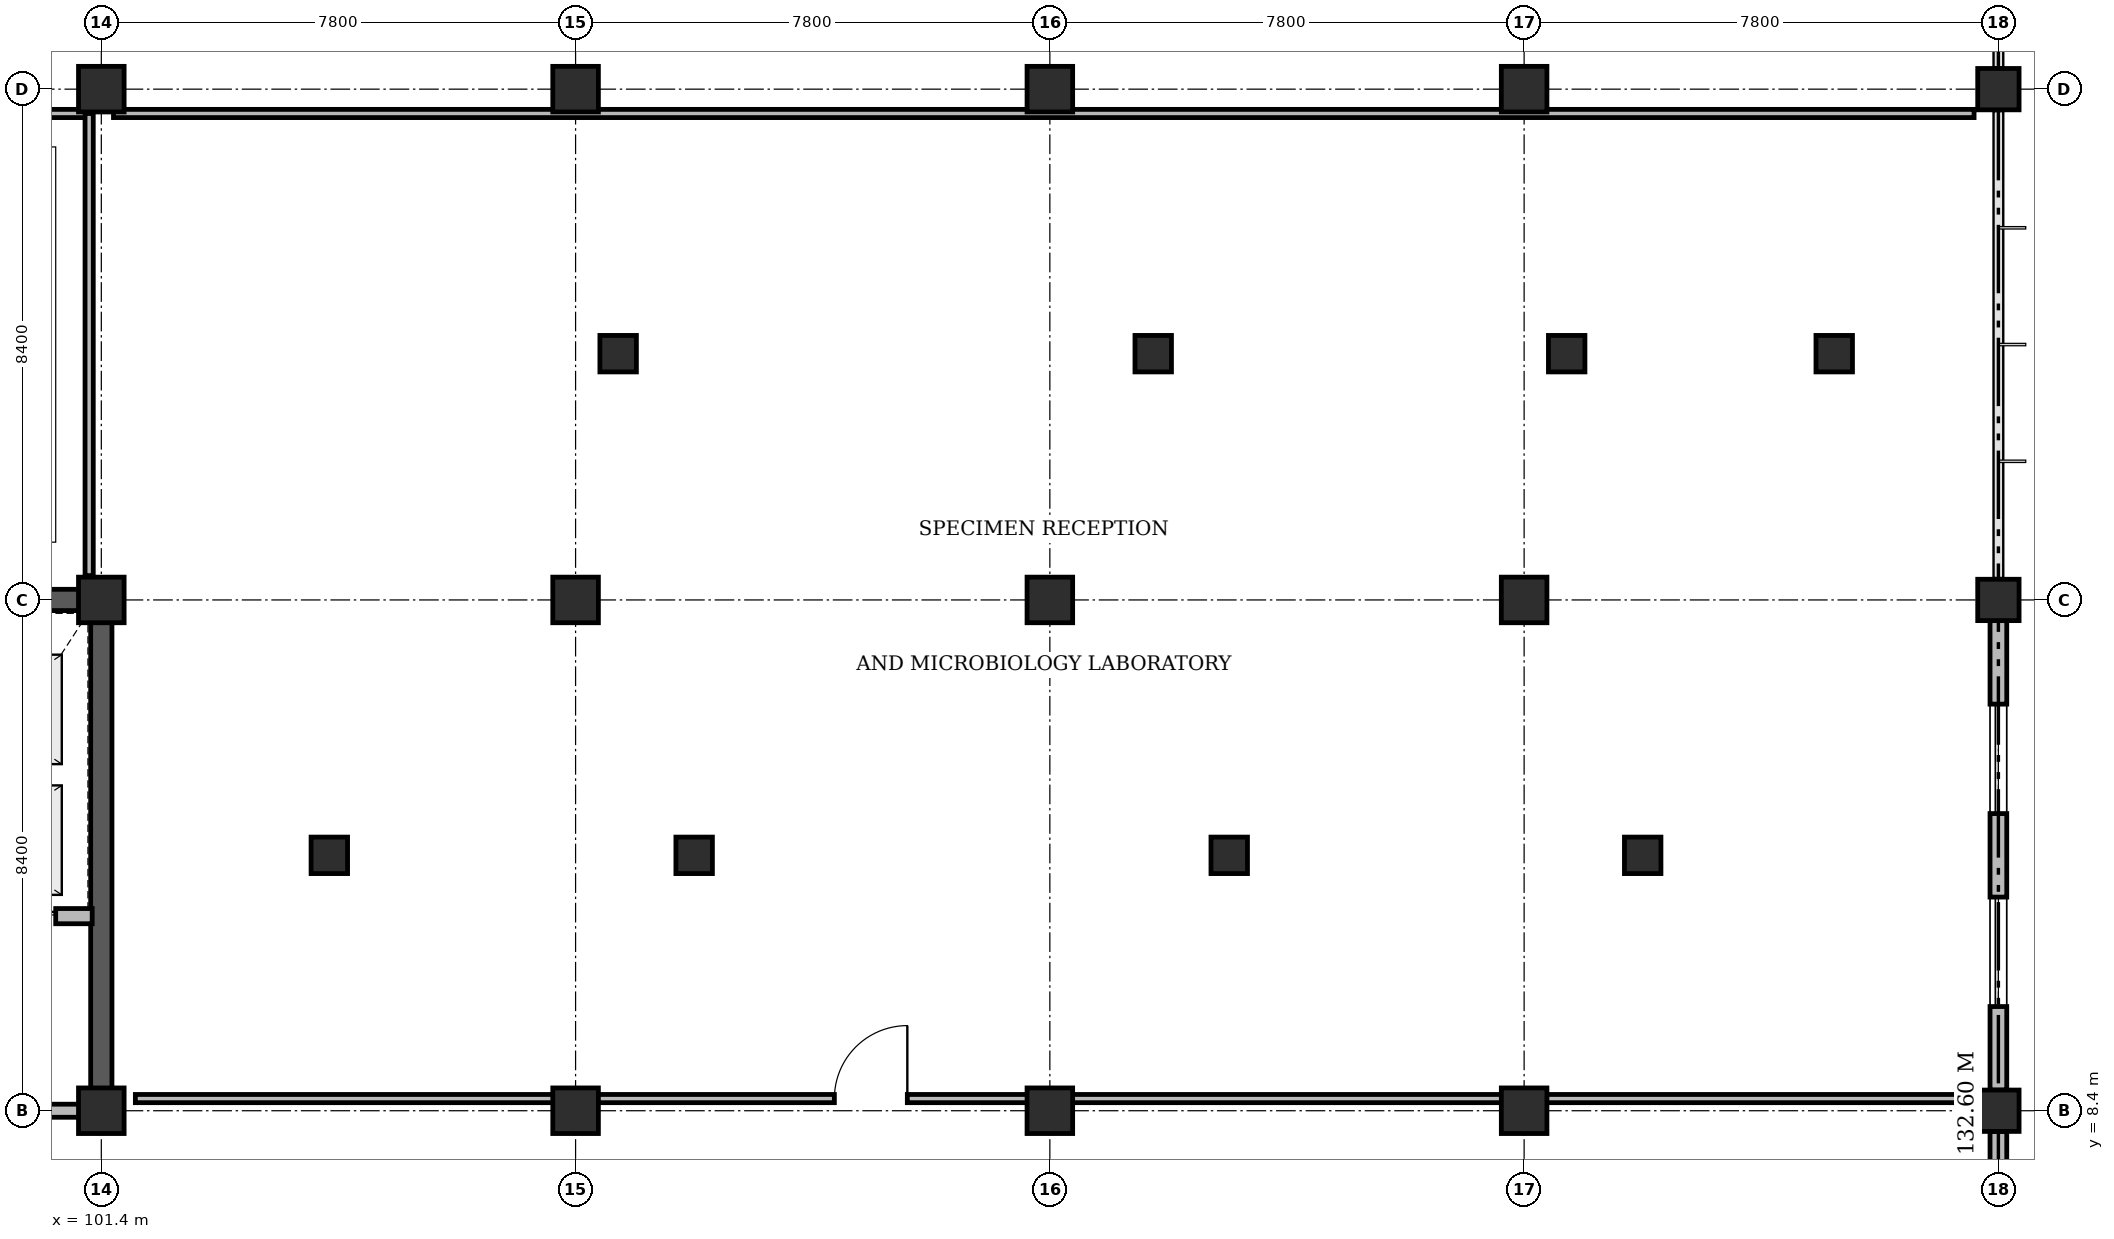
"""IFC4 building model, lengths in metres.
Left out: names, types, materials, properties, quantities, classifications, styles, units other than length and angle.
Written with IfcOpenShell. Run it as: python <this file> out.ifc"""

import sys

from ifc_helpers import new_model, si_unit, direction, frame, frame_2d, origin, origin_2d, place, context, subcontext, project, spatial, rectangle, circle, extrude, element, fill, save


model = new_model("IFC4")
c1 = context("Model", 3, precision=1e-05, world=origin(), true_north=direction((0.0, 1.0)))
c2 = subcontext(c1, "Body", "Model", "MODEL_VIEW")
j1 = project(units=[si_unit("LENGTHUNIT", "METRE"), si_unit("PLANEANGLEUNIT", "RADIAN")], contexts=[c1])
p1 = place(None, origin())
s1 = spatial("IfcSite", under=j1, at=p1, CompositionType="ELEMENT")
p2 = place(p1, origin())
s2 = spatial("IfcBuilding", under=s1, at=p2, CompositionType="ELEMENT")
p3 = place(p2, frame((0.0, 0.0, 4.8)))
s3 = spatial("IfcBuildingStorey", under=s2, at=p3, CompositionType="ELEMENT", Elevation=4.8)
p4 = place(p3, frame((93.425, 16.8, 0.0), z_axis=(0.0, 0.0, 1.0), x_axis=(1.0, 0.0, 0.0)))
e1 = element("IfcWall", 1, at=p4, inside=s3, PredefinedType="SHEAR", context=c2, shape_type="SweptSolid", body=[
    extrude(rectangle(XDim=8.15, YDim=0.35, at=frame_2d((4.075, 0.0))), origin(), (0.0, 0.0, 1.0), 4.48),
])
p5 = place(p3, frame((101.4, 8.4, 0.0), z_axis=(0.0, 0.0, 1.0), x_axis=(0.0, 1.0, 0.0)))
e2 = element("IfcWall", 2, at=p5, inside=s3, PredefinedType="SHEAR", context=c2, shape_type="SweptSolid", body=[
    extrude(rectangle(XDim=8.4, YDim=0.35, at=frame_2d((4.2, 0.0))), origin(), (0.0, 0.0, 1.0), 4.48),
])
for number, where, z_axis, x_axis in (
    (3, (101.4, 8.4, 0.0), (0.0, 0.0, 1.0), (1.0, 0.0, 0.0)),
    (4, (101.4, 16.8, 0.0), (0.0, 0.0, 1.0), (1.0, 0.0, 0.0)),
    (5, (101.4, 25.2, 0.0), (0.0, 0.0, 1.0), (1.0, 0.0, 0.0)),
    (6, (109.2, 8.4, 0.0), (0.0, 0.0, 1.0), (1.0, 0.0, 0.0)),
    (7, (109.2, 16.8, 0.0), (0.0, 0.0, 1.0), (1.0, 0.0, 0.0)),
    (8, (109.2, 25.2, 0.0), (0.0, 0.0, 1.0), (1.0, 0.0, 0.0)),
    (9, (117.0, 8.4, 0.0), (0.0, 0.0, 1.0), (1.0, 0.0, 0.0)),
    (10, (117.0, 16.8, 0.0), (0.0, 0.0, 1.0), (1.0, 0.0, 0.0)),
    (11, (117.0, 25.2, 0.0), (0.0, 0.0, 1.0), (1.0, 0.0, 0.0)),
    (12, (124.8, 8.4, 0.0), (0.0, 0.0, 1.0), (1.0, 0.0, 0.0)),
    (13, (124.8, 16.8, 0.0), (0.0, 0.0, 1.0), (1.0, 0.0, 0.0)),
    (14, (124.8, 25.2, 0.0), (0.0, 0.0, 1.0), (1.0, 0.0, 0.0)),
):
    element("IfcColumn", number, at=place(p3, frame(where, z_axis=z_axis, x_axis=x_axis)), inside=s3, PredefinedType="COLUMN", context=c2, shape_type="SweptSolid", body=[
        extrude(rectangle(XDim=0.75, YDim=0.75, at=origin_2d()), origin(), (0.0, 0.0, 1.0), 4.8),
    ])
for number, where, z_axis, x_axis in (
    (15, (132.6, 8.4, 0.0), (0.0, 0.0, 1.0), (1.0, 0.0, 0.0)),
    (16, (132.6, 16.8, 0.0), (0.0, 0.0, 1.0), (1.0, 0.0, 0.0)),
    (17, (132.6, 25.2, 0.0), (0.0, 0.0, 1.0), (1.0, 0.0, 0.0)),
):
    element("IfcColumn", number, at=place(p3, frame(where, z_axis=z_axis, x_axis=x_axis)), inside=s3, PredefinedType="COLUMN", context=c2, shape_type="SweptSolid", body=[
        extrude(rectangle(XDim=0.68, YDim=0.68, at=origin_2d()), origin(), (0.0, 0.0, 1.0), 4.8),
    ])
for number, where, z_axis, x_axis in (
    (18, (129.9, 20.85, 0.0), (0.0, 0.0, 1.0), (1.0, 0.0, 0.0)),
    (19, (126.75, 12.6, 0.0), (0.0, 0.0, 1.0), (1.0, 0.0, 0.0)),
    (20, (125.5, 20.85, 0.0), (0.0, 0.0, 1.0), (1.0, 0.0, 0.0)),
    (21, (119.95, 12.6, 0.0), (0.0, 0.0, 1.0), (1.0, 0.0, 0.0)),
    (22, (118.7, 20.85, 0.0), (0.0, 0.0, 1.0), (1.0, 0.0, 0.0)),
    (23, (111.15, 12.6, 0.0), (0.0, 0.0, 1.0), (1.0, 0.0, 0.0)),
    (24, (109.9, 20.85, 0.0), (0.0, 0.0, 1.0), (1.0, 0.0, 0.0)),
    (25, (105.15, 12.6, 0.0), (0.0, 0.0, 1.0), (1.0, 0.0, 0.0)),
):
    element("IfcColumn", number, at=place(p3, frame(where, z_axis=z_axis, x_axis=x_axis)), inside=s3, PredefinedType="PILASTER", context=c2, shape_type="SweptSolid", body=[
        extrude(circle(Radius=0.3, at=origin_2d()), origin(), (0.0, 0.0, 1.0), 4.8),
    ])
p6 = place(p3, frame((132.6, 8.06, 0.0), z_axis=(0.0, 0.0, 1.0), x_axis=(0.0, -1.0, 0.0)))
e26 = element("IfcWall", 26, at=p6, inside=s3, PredefinedType="STANDARD", context=c2, shape_type="SweptSolid", body=[
    extrude(rectangle(XDim=7.72, YDim=0.275, at=frame_2d((3.86, 0.0))), origin(), (0.0, 0.0, 1.0), 3.665),
])
p7 = place(p6, frame((1.373, 0.0, 0.9)))
e27 = element("IfcOpeningElement", 27, at=p7, cuts=e26, PredefinedType="OPENING", context=c2, shape_type="SweptSolid", body=[
    extrude(rectangle(XDim=1.8, YDim=1.65, at=frame_2d((0.9, 0.825))), frame((0.0, 0.147, 0.0), z_axis=(0.0, -1.0, 0.0), x_axis=(1.0, 0.0, 0.0)), (0.0, 0.0, 1.0), 0.295),
])
p8 = place(p6, frame((4.547, 0.0, 0.9)))
e28 = element("IfcOpeningElement", 28, at=p8, cuts=e26, PredefinedType="OPENING", context=c2, shape_type="SweptSolid", body=[
    extrude(rectangle(XDim=1.8, YDim=1.65, at=frame_2d((0.9, 0.825))), frame((0.0, 0.147, 0.0), z_axis=(0.0, -1.0, 0.0), x_axis=(1.0, 0.0, 0.0)), (0.0, 0.0, 1.0), 0.295),
])
p9 = place(p3, frame((132.6, 16.46, 0.0), z_axis=(0.0, 0.0, 1.0), x_axis=(0.0, -1.0, 0.0)))
e29 = element("IfcWall", 29, at=p9, inside=s3, PredefinedType="STANDARD", context=c2, shape_type="SweptSolid", body=[
    extrude(rectangle(XDim=7.72, YDim=0.275, at=frame_2d((3.86, 0.0))), origin(), (0.0, 0.0, 1.0), 3.665),
])
p10 = place(p9, frame((1.373, 0.0, 0.9)))
e30 = element("IfcOpeningElement", 30, at=p10, cuts=e29, PredefinedType="OPENING", context=c2, shape_type="SweptSolid", body=[
    extrude(rectangle(XDim=1.8, YDim=1.65, at=frame_2d((0.9, 0.825))), frame((0.0, 0.147, 0.0), z_axis=(0.0, -1.0, 0.0), x_axis=(1.0, 0.0, 0.0)), (0.0, 0.0, 1.0), 0.295),
])
p11 = place(p9, frame((4.547, 0.0, 0.9)))
e31 = element("IfcOpeningElement", 31, at=p11, cuts=e29, PredefinedType="OPENING", context=c2, shape_type="SweptSolid", body=[
    extrude(rectangle(XDim=1.8, YDim=1.65, at=frame_2d((0.9, 0.825))), frame((0.0, 0.147, 0.0), z_axis=(0.0, -1.0, 0.0), x_axis=(1.0, 0.0, 0.0)), (0.0, 0.0, 1.0), 0.295),
])
p12 = place(p3, frame((97.75, 8.4, 0.0), z_axis=(0.0, 0.0, 1.0), x_axis=(1.0, 0.0, 0.0)))
e32 = element("IfcWall", 32, at=p12, inside=s3, PredefinedType="STANDARD", context=c2, shape_type="SweptSolid", body=[
    extrude(rectangle(XDim=3.29, YDim=0.215, at=frame_2d((1.645, 0.0))), origin(), (0.0, 0.0, 1.0), 3.68),
])
p13 = place(p12, frame((0.865, 0.0, 0.0)))
e33 = element("IfcOpeningElement", 33, at=p13, cuts=e32, PredefinedType="OPENING", context=c2, shape_type="SweptSolid", body=[
    extrude(rectangle(XDim=1.56, YDim=2.2, at=frame_2d((0.78, 1.1))), frame((0.0, 0.118, 0.0), z_axis=(0.0, -1.0, 0.0), x_axis=(1.0, 0.0, 0.0)), (0.0, 0.0, 1.0), 0.235),
])
p14 = place(p3, frame((97.75, 11.6, 0.0), z_axis=(0.0, 0.0, 1.0), x_axis=(1.0, 0.0, 0.0)))
e34 = element("IfcWall", 34, at=p14, inside=s3, PredefinedType="STANDARD", context=c2, shape_type="SweptSolid", body=[
    extrude(rectangle(XDim=3.5, YDim=0.25, at=frame_2d((1.75, 0.0))), origin(), (0.0, 0.0, 1.0), 4.46),
])
p15 = place(p14, frame((0.35, 0.0, 0.0)))
e35 = element("IfcOpeningElement", 35, at=p15, cuts=e34, PredefinedType="OPENING", context=c2, shape_type="SweptSolid", body=[
    extrude(rectangle(XDim=1.1, YDim=2.2, at=frame_2d((0.55, 1.1))), frame((0.0, 0.135, 0.0), z_axis=(0.0, -1.0, 0.0), x_axis=(1.0, 0.0, 0.0)), (0.0, 0.0, 1.0), 0.27),
])
p16 = place(p14, frame((1.8, 0.0, 0.0)))
e36 = element("IfcOpeningElement", 36, at=p16, cuts=e34, PredefinedType="OPENING", context=c2, shape_type="SweptSolid", body=[
    extrude(rectangle(XDim=1.1, YDim=2.2, at=frame_2d((0.55, 1.1))), frame((0.0, 0.135, 0.0), z_axis=(0.0, -1.0, 0.0), x_axis=(1.0, 0.0, 0.0)), (0.0, 0.0, 1.0), 0.27),
])
p17 = place(p3, frame((60.0, 24.8, 0.0), z_axis=(0.0, 0.0, 1.0), x_axis=(1.0, 0.0, 0.0)))
e37 = element("IfcWall", 37, at=p17, inside=s3, PredefinedType="PARTITIONING", context=c2, shape_type="SweptSolid", body=[
    extrude(rectangle(XDim=41.2, YDim=0.135, at=frame_2d((20.6, 0.0))), origin(), (0.0, 0.0, 1.0), 3.68),
])
p18 = place(p3, frame((101.2, 17.2, 0.0), z_axis=(0.0, 0.0, 1.0), x_axis=(0.0, 1.0, 0.0)))
e38 = element("IfcWall", 38, at=p18, inside=s3, PredefinedType="PARTITIONING", context=c2, shape_type="SweptSolid", body=[
    extrude(rectangle(XDim=7.6, YDim=0.135, at=frame_2d((3.8, 0.0))), origin(), (0.0, 0.0, 1.0), 3.665),
])
p19 = place(p3, frame((101.96, 8.6, 0.0), z_axis=(0.0, 0.0, 1.0), x_axis=(1.0, 0.0, 0.0)))
e39 = element("IfcWall", 39, at=p19, inside=s3, PredefinedType="PARTITIONING", context=c2, shape_type="SweptSolid", body=[
    extrude(rectangle(XDim=30.24, YDim=0.135, at=frame_2d((15.12, 0.0))), origin(), (0.0, 0.0, 1.0), 3.68),
])
p20 = place(p19, frame((11.496, 0.0, 0.0)))
e40 = element("IfcOpeningElement", 40, at=p20, cuts=e39, PredefinedType="OPENING", context=c2, shape_type="SweptSolid", body=[
    extrude(rectangle(XDim=1.2, YDim=2.15, at=frame_2d((0.6, 1.075))), frame((0.0, 0.078, 0.0), z_axis=(0.0, -1.0, 0.0), x_axis=(1.0, 0.0, 0.0)), (0.0, 0.0, 1.0), 0.155),
])
p21 = place(p3, frame((101.6, 24.8, 0.0), z_axis=(0.0, 0.0, 1.0), x_axis=(1.0, 0.0, 0.0)))
e41 = element("IfcWall", 41, at=p21, inside=s3, PredefinedType="PARTITIONING", context=c2, shape_type="SweptSolid", body=[
    extrude(rectangle(XDim=30.6, YDim=0.135, at=frame_2d((15.3, 0.0))), origin(), (0.0, 0.0, 1.0), 3.68),
])
p22 = place(p10, origin())
e42 = element("IfcWindow", 42, at=p22, inside=s3, PartitioningType="SINGLE_PANEL", PredefinedType="WINDOW", context=c2, shape_type="SweptSolid", body=[
    extrude(rectangle(XDim=1.8, YDim=1.65, at=frame_2d((0.9, 0.825))), frame((0.0, 0.03, 0.0), z_axis=(0.0, -1.0, 0.0), x_axis=(1.0, 0.0, 0.0)), (0.0, 0.0, 1.0), 0.06),
])
fill(e30, e42)
p23 = place(p11, origin())
e43 = element("IfcWindow", 43, at=p23, inside=s3, PartitioningType="SINGLE_PANEL", PredefinedType="WINDOW", context=c2, shape_type="SweptSolid", body=[
    extrude(rectangle(XDim=1.8, YDim=1.65, at=frame_2d((0.9, 0.825))), frame((0.0, 0.03, 0.0), z_axis=(0.0, -1.0, 0.0), x_axis=(1.0, 0.0, 0.0)), (0.0, 0.0, 1.0), 0.06),
])
fill(e31, e43)
p24 = place(p16, origin())
e44 = element("IfcDoor", 44, at=p24, inside=s3, OperationType="SLIDING_TO_LEFT", PredefinedType="DOOR", context=c2, shape_type="SweptSolid", body=[
    extrude(rectangle(XDim=1.1, YDim=2.2, at=frame_2d((0.55, 1.1))), frame((0.0, 0.025, 0.0), z_axis=(0.0, -1.0, 0.0), x_axis=(1.0, 0.0, 0.0)), (0.0, 0.0, 1.0), 0.05),
])
fill(e36, e44)
p25 = place(p20, origin())
e45 = element("IfcDoor", 45, at=p25, inside=s3, OperationType="SINGLE_SWING_RIGHT", PredefinedType="DOOR", context=c2, shape_type="SweptSolid", body=[
    extrude(rectangle(XDim=1.2, YDim=2.15, at=frame_2d((0.6, 1.075))), frame((0.0, 0.025, 0.0), z_axis=(0.0, -1.0, 0.0), x_axis=(1.0, 0.0, 0.0)), (0.0, 0.0, 1.0), 0.05),
])
fill(e40, e45)
save(model, sys.argv[1])
